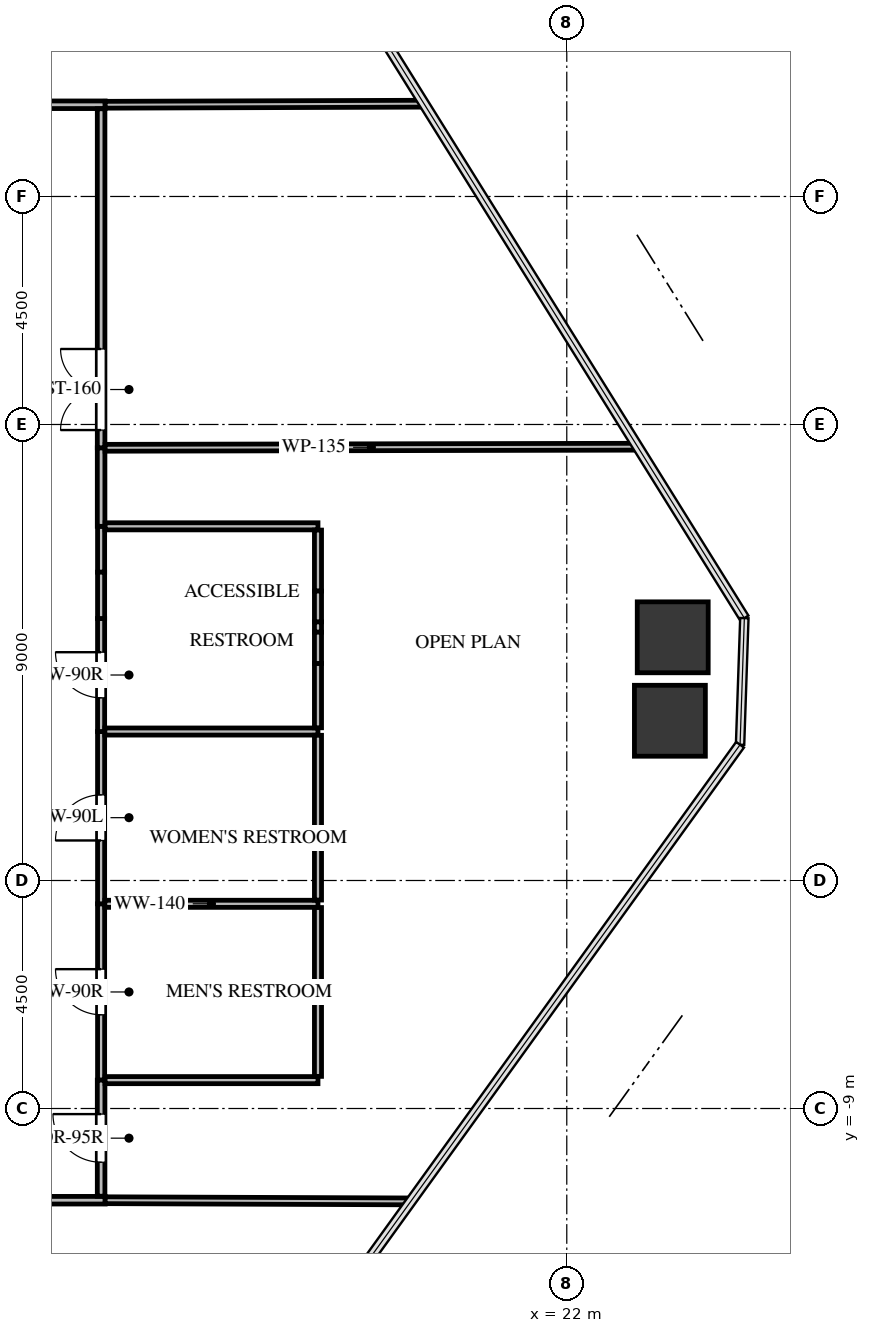
"""IFC4 building model, lengths in metres.
Left out: names, types, materials, properties, quantities, classifications, styles, units other than length and angle.
Written with IfcOpenShell. Run it as: python <this file> out.ifc"""

import sys

from ifc_helpers import new_model, si_unit, direction, frame, frame_2d, origin, origin_2d, place, context, subcontext, project, spatial, rectangle, extrude, source, transform, mapped, element, fill, save


model = new_model("IFC4")
c1 = context("Model", 3, precision=1e-05, world=origin(), true_north=direction((0.0, 1.0)))
c2 = subcontext(c1, "Body", "Model", "MODEL_VIEW")
j1 = project(units=[si_unit("LENGTHUNIT", "METRE"), si_unit("PLANEANGLEUNIT", "RADIAN")], contexts=[c1])
p1 = place(None, origin())
s1 = spatial("IfcSite", under=j1, at=p1, CompositionType="ELEMENT")
p2 = place(p1, origin())
s2 = spatial("IfcBuilding", under=s1, at=p2, CompositionType="ELEMENT")
p3 = place(p2, frame((0.0, 0.0, 65.4)))
s3 = spatial("IfcBuildingStorey", under=s2, at=p3, CompositionType="ELEMENT", Elevation=65.4)
m1 = source(origin(), c2, "Body", "SweptSolid", [
    extrude(rectangle(XDim=1.4, YDim=1.4, at=origin_2d()), origin(), (0.0, 0.0, 1.0), 3.3),
])
for number, where, z_axis, x_axis in (
    (1, (24.091, 0.3, -0.24), (0.0, 0.0, 1.0), (1.0, 0.0, 0.0)),
    (2, (24.035, -1.347, -0.24), (0.0, 0.0, 1.0), (1.0, 0.0, 0.0)),
):
    element("IfcColumn", number, at=place(p3, frame(where, z_axis=z_axis, x_axis=x_axis)), inside=s3, PredefinedType="COLUMN", context=c2, shape_type="MappedRepresentation", body=[
        mapped(m1, transform((0.0, 0.0, 0.0), x_axis=(1.0, 0.0, 0.0), y_axis=(0.0, 1.0, 0.0), z_axis=(0.0, 0.0, 1.0), scale=1.0)),
    ])
p4 = place(p3, frame((12.81, -8.44, 0.0), z_axis=(0.0, 0.0, 1.0), x_axis=(0.0, 1.0, 0.0)))
e3 = element("IfcWall", 3, at=p4, inside=s3, PredefinedType="PARTITIONING", context=c2, shape_type="SweptSolid", body=[
    extrude(rectangle(XDim=3.48, YDim=0.14, at=frame_2d((1.74, 0.0))), origin(), (0.0, 0.0, 1.0), 3.045),
])
p5 = place(p4, frame((1.29, 0.0, 0.0)))
e4 = element("IfcOpeningElement", 4, at=p5, cuts=e3, PredefinedType="OPENING", context=c2, shape_type="SweptSolid", body=[
    extrude(rectangle(XDim=0.9, YDim=2.05, at=frame_2d((0.45, 1.025))), frame((0.0, 0.08, 0.0), z_axis=(0.0, -1.0, 0.0), x_axis=(1.0, 0.0, 0.0)), (0.0, 0.0, 1.0), 0.16),
])
p6 = place(p3, frame((12.81, -4.96, 0.0), z_axis=(0.0, 0.0, 1.0), x_axis=(0.0, 1.0, 0.0)))
e5 = element("IfcWall", 5, at=p6, inside=s3, PredefinedType="PARTITIONING", context=c2, shape_type="SweptSolid", body=[
    extrude(rectangle(XDim=3.4, YDim=0.14, at=frame_2d((1.7, 0.0))), origin(), (0.0, 0.0, 1.0), 3.045),
])
p7 = place(p6, frame((1.25, 0.0, 0.0)))
e6 = element("IfcOpeningElement", 6, at=p7, cuts=e5, PredefinedType="OPENING", context=c2, shape_type="SweptSolid", body=[
    extrude(rectangle(XDim=0.9, YDim=2.05, at=frame_2d((0.45, 1.025))), frame((0.0, 0.08, 0.0), z_axis=(0.0, -1.0, 0.0), x_axis=(1.0, 0.0, 0.0)), (0.0, 0.0, 1.0), 0.16),
])
p8 = place(p3, frame((12.81, -1.56, 0.0), z_axis=(0.0, 0.0, 1.0), x_axis=(0.0, 1.0, 0.0)))
e7 = element("IfcWall", 7, at=p8, inside=s3, PredefinedType="PARTITIONING", context=c2, shape_type="SweptSolid", body=[
    extrude(rectangle(XDim=2.231, YDim=0.14, at=frame_2d((1.116, 0.0))), origin(), (0.0, 0.0, 1.0), 3.045),
])
p9 = place(p8, frame((0.666, 0.0, 0.0)))
e8 = element("IfcOpeningElement", 8, at=p9, cuts=e7, PredefinedType="OPENING", context=c2, shape_type="SweptSolid", body=[
    extrude(rectangle(XDim=0.9, YDim=2.05, at=frame_2d((0.45, 1.025))), frame((0.0, 0.08, 0.0), z_axis=(0.0, -1.0, 0.0), x_axis=(1.0, 0.0, 0.0)), (0.0, 0.0, 1.0), 0.16),
])
p10 = place(p3, frame((12.81, 1.585, 0.0), z_axis=(0.0, 0.0, 1.0), x_axis=(0.0, 1.0, 0.0)))
e9 = element("IfcWall", 9, at=p10, inside=s3, PredefinedType="PARTITIONING", context=c2, shape_type="SweptSolid", body=[
    extrude(rectangle(XDim=0.905, YDim=0.14, at=frame_2d((0.453, 0.0))), origin(), (0.0, 0.0, 1.0), 3.045),
])
p11 = place(p3, frame((12.81, 0.671, 0.0), z_axis=(0.0, 0.0, 1.0), x_axis=(0.0, 1.0, 0.0)))
e10 = element("IfcWall", 10, at=p11, inside=s3, PredefinedType="PARTITIONING", context=c2, shape_type="SweptSolid", body=[
    extrude(rectangle(XDim=0.914, YDim=0.14, at=frame_2d((0.457, 0.0))), origin(), (0.0, 0.0, 1.0), 2.13),
])
p12 = place(p3, frame((12.89, 10.81, 0.0), z_axis=(0.0, 0.0, 1.0), x_axis=(-1.0, 0.0, 0.0)))
e11 = element("IfcWall", 11, at=p12, inside=s3, PredefinedType="PARTITIONING", context=c2, shape_type="SweptSolid", body=[
    extrude(rectangle(XDim=1.847, YDim=0.15, at=frame_2d((0.924, 0.0))), origin(), (0.0, 0.0, 1.0), 3.045),
])
p13 = place(p3, frame((6.04, -10.81, 0.0), z_axis=(0.0, 0.0, 1.0), x_axis=(1.0, 0.0, 0.0)))
e12 = element("IfcWall", 12, at=p13, inside=s3, PredefinedType="PARTITIONING", context=c2, shape_type="SweptSolid", body=[
    extrude(rectangle(XDim=6.85, YDim=0.15, at=frame_2d((3.425, 0.0))), origin(), (0.0, 0.0, 1.0), 3.045),
])
p14 = place(p13, frame((2.95, 0.0, 0.0)))
e13 = element("IfcOpeningElement", 13, at=p14, cuts=e12, PredefinedType="OPENING", context=c2, shape_type="SweptSolid", body=[
    extrude(rectangle(XDim=0.95, YDim=2.1, at=frame_2d((0.475, 1.05))), frame((0.0, 0.085, 0.0), z_axis=(0.0, -1.0, 0.0), x_axis=(1.0, 0.0, 0.0)), (0.0, 0.0, 1.0), 0.17),
])
p15 = place(p3, frame((12.81, -10.731, 0.0), z_axis=(0.0, 0.0, 1.0), x_axis=(0.0, 1.0, 0.0)))
e14 = element("IfcWall", 14, at=p15, inside=s3, PredefinedType="PARTITIONING", context=c2, shape_type="SweptSolid", body=[
    extrude(rectangle(XDim=2.291, YDim=0.15, at=frame_2d((1.146, 0.0))), origin(), (0.0, 0.0, 1.0), 3.045),
])
p16 = place(p15, frame((0.67, 0.0, 0.0)))
e15 = element("IfcOpeningElement", 15, at=p16, cuts=e14, PredefinedType="OPENING", context=c2, shape_type="SweptSolid", body=[
    extrude(rectangle(XDim=0.95, YDim=2.1, at=frame_2d((0.475, 1.05))), frame((0.0, 0.085, 0.0), z_axis=(0.0, -1.0, 0.0), x_axis=(1.0, 0.0, 0.0)), (0.0, 0.0, 1.0), 0.17),
])
p17 = place(p3, frame((12.81, 2.49, 0.0), z_axis=(0.0, 0.0, 1.0), x_axis=(0.0, 1.0, 0.0)))
e16 = element("IfcWall", 16, at=p17, inside=s3, PredefinedType="PARTITIONING", context=c2, shape_type="SweptSolid", body=[
    extrude(rectangle(XDim=1.55, YDim=0.15, at=frame_2d((0.775, 0.0))), origin(), (0.0, 0.0, 1.0), 3.045),
])
p18 = place(p3, frame((12.81, 4.04, 0.0), z_axis=(0.0, 0.0, 1.0), x_axis=(0.0, 1.0, 0.0)))
e17 = element("IfcWall", 17, at=p18, inside=s3, PredefinedType="PARTITIONING", context=c2, shape_type="SweptSolid", body=[
    extrude(rectangle(XDim=6.691, YDim=0.15, at=frame_2d((3.345, 0.0))), origin(), (0.0, 0.0, 1.0), 3.045),
])
p19 = place(p18, frame((0.35, 0.0, 0.0)))
e18 = element("IfcOpeningElement", 18, at=p19, cuts=e17, PredefinedType="OPENING", context=c2, shape_type="SweptSolid", body=[
    extrude(rectangle(XDim=1.6, YDim=2.15, at=frame_2d((0.8, 1.075))), frame((0.0, 0.085, 0.0), z_axis=(0.0, -1.0, 0.0), x_axis=(1.0, 0.0, 0.0)), (0.0, 0.0, 1.0), 0.17),
])
p20 = place(p3, frame((12.884, -4.96, 0.0), z_axis=(0.0, 0.0, 1.0), x_axis=(1.0, 0.0, 0.0)))
e19 = element("IfcWall", 19, at=p20, inside=s3, PredefinedType="PARTITIONING", context=c2, shape_type="SweptSolid", body=[
    extrude(rectangle(XDim=4.206, YDim=0.14, at=frame_2d((2.103, 0.0))), origin(), (0.0, 0.0, 1.0), 3.045),
])
p21 = place(p3, frame((17.09, -8.44, 0.0), z_axis=(0.0, 0.0, 1.0), x_axis=(-1.0, 0.0, 0.0)))
e20 = element("IfcWall", 20, at=p21, inside=s3, PredefinedType="PARTITIONING", context=c2, shape_type="SweptSolid", body=[
    extrude(rectangle(XDim=4.201, YDim=0.14, at=frame_2d((2.101, 0.0))), origin(), (0.0, 0.0, 1.0), 3.045),
])
p22 = place(p3, frame((17.09, -5.034, 0.0), z_axis=(0.0, 0.0, 1.0), x_axis=(0.0, -1.0, 0.0)))
e21 = element("IfcWall", 21, at=p22, inside=s3, PredefinedType="PARTITIONING", context=c2, shape_type="SweptSolid", body=[
    extrude(rectangle(XDim=3.332, YDim=0.14, at=frame_2d((1.666, 0.0))), origin(), (0.0, 0.0, 1.0), 3.045),
])
p23 = place(p3, frame((12.884, -1.56, 0.0), z_axis=(0.0, 0.0, 1.0), x_axis=(1.0, 0.0, 0.0)))
e22 = element("IfcWall", 22, at=p23, inside=s3, PredefinedType="PARTITIONING", context=c2, shape_type="SweptSolid", body=[
    extrude(rectangle(XDim=4.206, YDim=0.14, at=frame_2d((2.103, 0.0))), origin(), (0.0, 0.0, 1.0), 3.045),
])
p24 = place(p3, frame((17.09, -1.634, 0.0), z_axis=(0.0, 0.0, 1.0), x_axis=(0.0, -1.0, 0.0)))
e23 = element("IfcWall", 23, at=p24, inside=s3, PredefinedType="PARTITIONING", context=c2, shape_type="SweptSolid", body=[
    extrude(rectangle(XDim=3.252, YDim=0.14, at=frame_2d((1.626, 0.0))), origin(), (0.0, 0.0, 1.0), 3.045),
])
p25 = place(p3, frame((12.889, 2.49, 0.0), z_axis=(0.0, 0.0, 1.0), x_axis=(1.0, 0.0, 0.0)))
e24 = element("IfcWall", 24, at=p25, inside=s3, PredefinedType="PARTITIONING", context=c2, shape_type="SweptSolid", body=[
    extrude(rectangle(XDim=4.201, YDim=0.14, at=frame_2d((2.101, 0.0))), origin(), (0.0, 0.0, 1.0), 3.045),
])
p26 = place(p3, frame((17.09, 2.416, 0.0), z_axis=(0.0, 0.0, 1.0), x_axis=(0.0, -1.0, 0.0)))
e25 = element("IfcWall", 25, at=p26, inside=s3, PredefinedType="PARTITIONING", context=c2, shape_type="SweptSolid", body=[
    extrude(rectangle(XDim=1.204, YDim=0.14, at=frame_2d((0.602, 0.0))), origin(), (0.0, 0.0, 1.0), 3.045),
])
p27 = place(p3, frame((17.09, 0.606, 0.0), z_axis=(0.0, 0.0, 1.0), x_axis=(0.0, -1.0, 0.0)))
e26 = element("IfcWall", 26, at=p27, inside=s3, PredefinedType="PARTITIONING", context=c2, shape_type="SweptSolid", body=[
    extrude(rectangle(XDim=0.205, YDim=0.14, at=frame_2d((0.103, 0.0))), origin(), (0.0, 0.0, 1.0), 3.045),
])
p28 = place(p3, frame((17.09, -0.216, 0.0), z_axis=(0.0, 0.0, 1.0), x_axis=(0.0, -1.0, 0.0)))
e27 = element("IfcWall", 27, at=p28, inside=s3, PredefinedType="PARTITIONING", context=c2, shape_type="SweptSolid", body=[
    extrude(rectangle(XDim=1.27, YDim=0.14, at=frame_2d((0.635, 0.0))), origin(), (0.0, 0.0, 1.0), 3.045),
])
p29 = place(p3, frame((17.09, 1.212, 0.0), z_axis=(0.0, 0.0, 1.0), x_axis=(0.0, -1.0, 0.0)))
e28 = element("IfcWall", 28, at=p29, inside=s3, PredefinedType="PARTITIONING", context=c2, shape_type="SweptSolid", body=[
    extrude(rectangle(XDim=0.606, YDim=0.14, at=frame_2d((0.303, 0.0))), origin(), (0.0, 0.0, 1.0), 2.13),
])
p30 = place(p3, frame((17.09, 0.401, 0.0), z_axis=(0.0, 0.0, 1.0), x_axis=(0.0, -1.0, 0.0)))
e29 = element("IfcWall", 29, at=p30, inside=s3, PredefinedType="PARTITIONING", context=c2, shape_type="SweptSolid", body=[
    extrude(rectangle(XDim=0.617, YDim=0.14, at=frame_2d((0.309, 0.0))), origin(), (0.0, 0.0, 1.0), 2.13),
])
p31 = place(p3, frame((19.182, 10.831, 0.0), z_axis=(0.0, 0.0, 1.0), x_axis=(-0.999994432845, -0.003336806783, 0.0)))
e30 = element("IfcWall", 30, at=p31, inside=s3, PredefinedType="PARTITIONING", context=c2, shape_type="SweptSolid", body=[
    extrude(rectangle(XDim=6.292, YDim=0.135, at=frame_2d((3.146, 0.0))), origin(), (0.0, 0.0, 1.0), 2.38),
])
p32 = place(p3, frame((12.89, -10.81, 0.0), z_axis=(0.0, 0.0, 1.0), x_axis=(0.999992607823, -0.003845035728, 0.0)))
e31 = element("IfcWall", 31, at=p32, inside=s3, PredefinedType="PARTITIONING", context=c2, shape_type="SweptSolid", body=[
    extrude(rectangle(XDim=6.032, YDim=0.135, at=frame_2d((3.016, 0.0))), origin(), (0.0, 0.0, 1.0), 2.38),
])
p33 = place(p3, frame((12.889, 4.04, 0.0), z_axis=(0.0, 0.0, 1.0), x_axis=(0.999998004093, 0.001997951593, 0.0)))
e32 = element("IfcWall", 32, at=p33, inside=s3, PredefinedType="PARTITIONING", context=c2, shape_type="SweptSolid", body=[
    extrude(rectangle(XDim=10.509, YDim=0.135, at=frame_2d((5.254, 0.0))), origin(), (0.0, 0.0, 1.0), 2.38),
])
m2 = source(origin(), c2, "Body", "SweptSolid", [
    extrude(rectangle(XDim=0.9, YDim=2.05, at=frame_2d((0.45, 1.025))), frame((0.0, 0.025, 0.0), z_axis=(0.0, -1.0, 0.0), x_axis=(1.0, 0.0, 0.0)), (0.0, 0.0, 1.0), 0.05),
])
p34 = place(p5, origin())
e33 = element("IfcDoor", 33, at=p34, inside=s3, OperationType="SINGLE_SWING_RIGHT", PredefinedType="DOOR", context=c2, shape_type="MappedRepresentation", body=[
    mapped(m2, transform((0.0, 0.0, 0.0), x_axis=(1.0, 0.0, 0.0), y_axis=(0.0, 1.0, 0.0), z_axis=(0.0, 0.0, 1.0), scale=1.0)),
])
fill(e4, e33)
m3 = source(origin(), c2, "Body", "SweptSolid", [
    extrude(rectangle(XDim=0.9, YDim=2.05, at=frame_2d((0.45, 1.025))), frame((0.0, 0.025, 0.0), z_axis=(0.0, -1.0, 0.0), x_axis=(1.0, 0.0, 0.0)), (0.0, 0.0, 1.0), 0.05),
])
p35 = place(p7, origin())
e34 = element("IfcDoor", 34, at=p35, inside=s3, OperationType="SINGLE_SWING_LEFT", PredefinedType="DOOR", context=c2, shape_type="MappedRepresentation", body=[
    mapped(m3, transform((0.0, 0.0, 0.0), x_axis=(1.0, 0.0, 0.0), y_axis=(0.0, 1.0, 0.0), z_axis=(0.0, 0.0, 1.0), scale=1.0)),
])
fill(e6, e34)
p36 = place(p9, origin())
e35 = element("IfcDoor", 35, at=p36, inside=s3, OperationType="SINGLE_SWING_RIGHT", PredefinedType="DOOR", context=c2, shape_type="MappedRepresentation", body=[
    mapped(m2, transform((0.0, 0.0, 0.0), x_axis=(1.0, 0.0, 0.0), y_axis=(0.0, 1.0, 0.0), z_axis=(0.0, 0.0, 1.0), scale=1.0)),
])
fill(e8, e35)
m4 = source(origin(), c2, "Body", "SweptSolid", [
    extrude(rectangle(XDim=0.95, YDim=2.1, at=frame_2d((0.475, 1.05))), frame((0.0, 0.025, 0.0), z_axis=(0.0, -1.0, 0.0), x_axis=(1.0, 0.0, 0.0)), (0.0, 0.0, 1.0), 0.05),
])
p37 = place(p16, origin())
e36 = element("IfcDoor", 36, at=p37, inside=s3, OperationType="SINGLE_SWING_RIGHT", PredefinedType="DOOR", context=c2, shape_type="MappedRepresentation", body=[
    mapped(m4, transform((0.0, 0.0, 0.0), x_axis=(1.0, 0.0, 0.0), y_axis=(0.0, 1.0, 0.0), z_axis=(0.0, 0.0, 1.0), scale=1.0)),
])
fill(e15, e36)
m5 = source(origin(), c2, "Body", "SweptSolid", [
    extrude(rectangle(XDim=1.6, YDim=2.15, at=frame_2d((0.8, 1.075))), frame((0.0, 0.025, 0.0), z_axis=(0.0, -1.0, 0.0), x_axis=(1.0, 0.0, 0.0)), (0.0, 0.0, 1.0), 0.05),
])
p38 = place(p19, origin())
e37 = element("IfcDoor", 37, at=p38, inside=s3, OperationType="DOUBLE_DOOR_SINGLE_SWING", PredefinedType="DOOR", context=c2, shape_type="MappedRepresentation", body=[
    mapped(m5, transform((0.0, 0.0, 0.0), x_axis=(1.0, 0.0, 0.0), y_axis=(0.0, 1.0, 0.0), z_axis=(0.0, 0.0, 1.0), scale=1.0)),
])
fill(e18, e37)
save(model, sys.argv[1])
